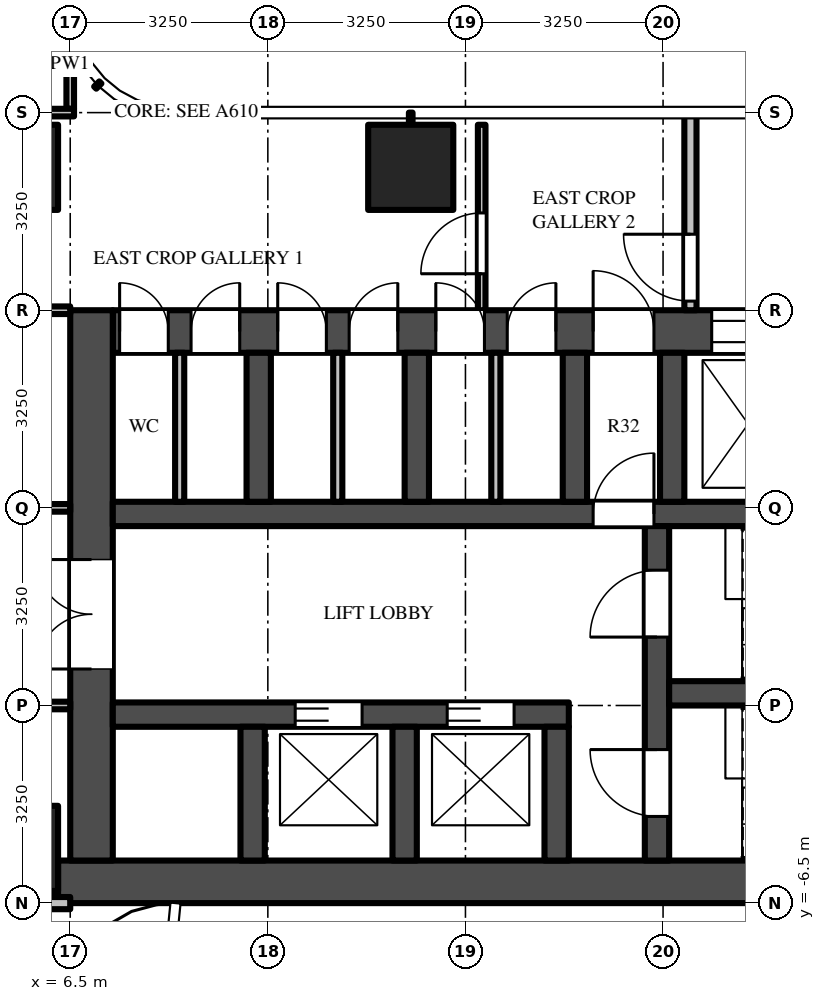
"""IFC4 building model, lengths in metres.
Left out: names, types, materials, properties, quantities, classifications, styles, units other than length and angle.
Written with IfcOpenShell. Run it as: python <this file> out.ifc"""

import sys

from ifc_helpers import new_model, si_unit, direction, frame, frame_2d, origin, origin_2d, place, context, subcontext, project, spatial, rectangle, extrude, source, transform, mapped, element, fill, save


model = new_model("IFC4")
c1 = context("Model", 3, precision=1e-05, world=origin(), true_north=direction((0.0, 1.0)))
c2 = subcontext(c1, "Body", "Model", "MODEL_VIEW")
j1 = project(units=[si_unit("LENGTHUNIT", "METRE"), si_unit("PLANEANGLEUNIT", "RADIAN")], contexts=[c1])
p1 = place(None, origin())
s1 = spatial("IfcSite", under=j1, at=p1, CompositionType="ELEMENT")
p2 = place(p1, origin())
s2 = spatial("IfcBuilding", under=s1, at=p2, CompositionType="ELEMENT")
p3 = place(p2, frame((0.0, 0.0, 74.5)))
s3 = spatial("IfcBuildingStorey", under=s2, at=p3, CompositionType="ELEMENT", Elevation=74.5)
m1 = source(origin(), c2, "Body", "SweptSolid", [
    extrude(rectangle(XDim=1.4, YDim=1.4, at=origin_2d()), origin(), (0.0, 0.0, 1.0), 4.5),
])
for number, where, z_axis, x_axis in (
    (1, (12.1, 5.6, 0.0), (0.0, 0.0, 1.0), (1.0, 0.0, 0.0)),
    (2, (5.6, 5.6, 0.0), (0.0, 0.0, 1.0), (1.0, 0.0, 0.0)),
    (3, (5.6, -5.6, 0.0), (0.0, 0.0, 1.0), (1.0, 0.0, 0.0)),
):
    element("IfcColumn", number, at=place(p3, frame(where, z_axis=z_axis, x_axis=x_axis)), inside=s3, PredefinedType="COLUMN", context=c2, shape_type="MappedRepresentation", body=[
        mapped(m1, transform((0.0, 0.0, 0.0))),
    ])
m2 = source(origin(), c2, "Body", "SweptSolid", [
    extrude(rectangle(XDim=16.45, YDim=0.7, at=frame_2d((8.225, 0.0))), origin(), (0.0, 0.0, 1.0), 4.25),
])
p4 = place(p3, frame((6.3, -6.15, 0.0), z_axis=(0.0, 0.0, 1.0), x_axis=(1.0, 0.0, 0.0)))
e4 = element("IfcWall", 4, at=p4, inside=s3, PredefinedType="SHEAR", context=c2, shape_type="MappedRepresentation", body=[
    mapped(m2, transform((0.0, 0.0, 0.0))),
])
m3 = source(origin(), c2, "Body", "SweptSolid", [
    extrude(rectangle(XDim=14.85, YDim=0.7, at=frame_2d((7.425, 0.0))), origin(), (0.0, 0.0, 1.0), 4.25),
])
p5 = place(p3, frame((7.2, 2.9, 0.0), z_axis=(0.0, 0.0, 1.0), x_axis=(1.0, 0.0, 0.0)))
e5 = element("IfcWall", 5, at=p5, inside=s3, PredefinedType="SHEAR", context=c2, shape_type="MappedRepresentation", body=[
    mapped(m3, transform((0.0, 0.0, 0.0))),
])
m4 = source(origin(), c2, "Body", "SweptSolid", [
    extrude(rectangle(XDim=1.3, YDim=2.1, at=frame_2d((0.65, 1.05))), frame((0.0, 0.36, 0.0), z_axis=(0.0, -1.0, 0.0), x_axis=(1.0, 0.0, 0.0)), (0.0, 0.0, 1.0), 0.72),
])
p6 = place(p5, frame((12.2, 0.0, 0.0)))
e6 = element("IfcOpeningElement", 6, at=p6, cuts=e5, PredefinedType="OPENING", context=c2, shape_type="MappedRepresentation", body=[
    mapped(m4, transform((0.0, 0.0, 0.0))),
])
m5 = source(origin(), c2, "Body", "SweptSolid", [
    extrude(rectangle(XDim=1.2, YDim=2.1, at=frame_2d((0.6, 1.05))), frame((0.0, 0.36, 0.0), z_axis=(0.0, -1.0, 0.0), x_axis=(1.0, 0.0, 0.0)), (0.0, 0.0, 1.0), 0.72),
])
p7 = place(p5, frame((9.85, 0.0, 0.0)))
e7 = element("IfcOpeningElement", 7, at=p7, cuts=e5, PredefinedType="OPENING", context=c2, shape_type="MappedRepresentation", body=[
    mapped(m5, transform((0.0, 0.0, 0.0))),
])
m6 = source(origin(), c2, "Body", "SweptSolid", [
    extrude(rectangle(XDim=1.0, YDim=2.1, at=frame_2d((0.5, 1.05))), frame((0.0, 0.36, 0.0), z_axis=(0.0, -1.0, 0.0), x_axis=(1.0, 0.0, 0.0)), (0.0, 0.0, 1.0), 0.72),
])
p8 = place(p5, frame((7.9, 0.0, 0.0)))
e8 = element("IfcOpeningElement", 8, at=p8, cuts=e5, PredefinedType="OPENING", context=c2, shape_type="MappedRepresentation", body=[
    mapped(m6, transform((0.0, 0.0, 0.0))),
])
m7 = source(origin(), c2, "Body", "SweptSolid", [
    extrude(rectangle(XDim=0.8, YDim=2.1, at=frame_2d((0.4, 1.05))), frame((0.0, 0.36, 0.0), z_axis=(0.0, -1.0, 0.0), x_axis=(1.0, 0.0, 0.0)), (0.0, 0.0, 1.0), 0.72),
])
p9 = place(p5, frame((0.113, 0.0, 0.0)))
e9 = element("IfcOpeningElement", 9, at=p9, cuts=e5, PredefinedType="OPENING", context=c2, shape_type="MappedRepresentation", body=[
    mapped(m7, transform((0.0, 0.0, 0.0))),
])
p10 = place(p5, frame((1.288, 0.0, 0.0)))
e10 = element("IfcOpeningElement", 10, at=p10, cuts=e5, PredefinedType="OPENING", context=c2, shape_type="MappedRepresentation", body=[
    mapped(m7, transform((0.0, 0.0, 0.0))),
])
p11 = place(p5, frame((2.712, 0.0, 0.0)))
e11 = element("IfcOpeningElement", 11, at=p11, cuts=e5, PredefinedType="OPENING", context=c2, shape_type="MappedRepresentation", body=[
    mapped(m7, transform((0.0, 0.0, 0.0))),
])
p12 = place(p5, frame((3.887, 0.0, 0.0)))
e12 = element("IfcOpeningElement", 12, at=p12, cuts=e5, PredefinedType="OPENING", context=c2, shape_type="MappedRepresentation", body=[
    mapped(m7, transform((0.0, 0.0, 0.0))),
])
p13 = place(p5, frame((5.312, 0.0, 0.0)))
e13 = element("IfcOpeningElement", 13, at=p13, cuts=e5, PredefinedType="OPENING", context=c2, shape_type="MappedRepresentation", body=[
    mapped(m7, transform((0.0, 0.0, 0.0))),
])
p14 = place(p5, frame((6.488, 0.0, 0.0)))
e14 = element("IfcOpeningElement", 14, at=p14, cuts=e5, PredefinedType="OPENING", context=c2, shape_type="MappedRepresentation", body=[
    mapped(m7, transform((0.0, 0.0, 0.0))),
])
m8 = source(origin(), c2, "Body", "SweptSolid", [
    extrude(rectangle(XDim=9.05, YDim=0.7, at=frame_2d((4.525, 0.0))), origin(), (0.0, 0.0, 1.0), 4.25),
])
p15 = place(p3, frame((6.85, -5.8, 0.0), z_axis=(0.0, 0.0, 1.0), x_axis=(0.0, 1.0, 0.0)))
e15 = element("IfcWall", 15, at=p15, inside=s3, PredefinedType="SHEAR", context=c2, shape_type="MappedRepresentation", body=[
    mapped(m8, transform((0.0, 0.0, 0.0))),
])
m9 = source(origin(), c2, "Body", "SweptSolid", [
    extrude(rectangle(XDim=1.8, YDim=2.1, at=frame_2d((0.9, 1.05))), frame((0.0, 0.36, 0.0), z_axis=(0.0, -1.0, 0.0), x_axis=(1.0, 0.0, 0.0)), (0.0, 0.0, 1.0), 0.72),
])
p16 = place(p15, frame((3.15, 0.0, 0.0)))
e16 = element("IfcOpeningElement", 16, at=p16, cuts=e15, PredefinedType="OPENING", context=c2, shape_type="MappedRepresentation", body=[
    mapped(m9, transform((0.0, 0.0, 0.0))),
])
m10 = source(origin(), c2, "Body", "SweptSolid", [
    extrude(rectangle(XDim=7.5, YDim=0.4, at=frame_2d((3.75, 0.0))), origin(), (0.0, 0.0, 1.0), 4.25),
])
p17 = place(p3, frame((7.2, -3.4, 0.0), z_axis=(0.0, 0.0, 1.0), x_axis=(1.0, 0.0, 0.0)))
e17 = element("IfcWall", 17, at=p17, inside=s3, PredefinedType="SHEAR", context=c2, shape_type="MappedRepresentation", body=[
    mapped(m10, transform((0.0, 0.0, 0.0))),
])
m11 = source(origin(), c2, "Body", "SweptSolid", [
    extrude(rectangle(XDim=1.1, YDim=2.1, at=frame_2d((0.55, 1.05))), frame((0.0, 0.21, 0.0), z_axis=(0.0, -1.0, 0.0), x_axis=(1.0, 0.0, 0.0)), (0.0, 0.0, 1.0), 0.42),
])
p18 = place(p17, frame((3.0, 0.0, 0.0)))
e18 = element("IfcOpeningElement", 18, at=p18, cuts=e17, PredefinedType="OPENING", context=c2, shape_type="MappedRepresentation", body=[
    mapped(m11, transform((0.0, 0.0, 0.0))),
])
p19 = place(p17, frame((5.5, 0.0, 0.0)))
e19 = element("IfcOpeningElement", 19, at=p19, cuts=e17, PredefinedType="OPENING", context=c2, shape_type="MappedRepresentation", body=[
    mapped(m11, transform((0.0, 0.0, 0.0))),
])
m12 = source(origin(), c2, "Body", "SweptSolid", [
    extrude(rectangle(XDim=14.85, YDim=0.4, at=frame_2d((7.425, 0.0))), origin(), (0.0, 0.0, 1.0), 4.25),
])
p20 = place(p3, frame((7.2, -0.1, 0.0), z_axis=(0.0, 0.0, 1.0), x_axis=(1.0, 0.0, 0.0)))
e20 = element("IfcWall", 20, at=p20, inside=s3, PredefinedType="SHEAR", context=c2, shape_type="MappedRepresentation", body=[
    mapped(m12, transform((0.0, 0.0, 0.0))),
])
m13 = source(origin(), c2, "Body", "SweptSolid", [
    extrude(rectangle(XDim=1.0, YDim=2.1, at=frame_2d((0.5, 1.05))), frame((0.0, 0.21, 0.0), z_axis=(0.0, -1.0, 0.0), x_axis=(1.0, 0.0, 0.0)), (0.0, 0.0, 1.0), 0.42),
])
p21 = place(p20, frame((7.9, 0.0, 0.0)))
e21 = element("IfcOpeningElement", 21, at=p21, cuts=e20, PredefinedType="OPENING", context=c2, shape_type="MappedRepresentation", body=[
    mapped(m13, transform((0.0, 0.0, 0.0))),
])
m14 = source(origin(), c2, "Body", "SweptSolid", [
    extrude(rectangle(XDim=5.5, YDim=0.4, at=frame_2d((2.75, 0.0))), origin(), (0.0, 0.0, 1.0), 4.25),
])
p22 = place(p3, frame((16.15, -5.8, 0.0), z_axis=(0.0, 0.0, 1.0), x_axis=(0.0, 1.0, 0.0)))
e22 = element("IfcWall", 22, at=p22, inside=s3, PredefinedType="SHEAR", context=c2, shape_type="MappedRepresentation", body=[
    mapped(m14, transform((0.0, 0.0, 0.0))),
])
p23 = place(p22, frame((0.725, 0.0, 0.0)))
e23 = element("IfcOpeningElement", 23, at=p23, cuts=e22, PredefinedType="OPENING", context=c2, shape_type="MappedRepresentation", body=[
    mapped(m11, transform((0.0, 0.0, 0.0))),
])
p24 = place(p22, frame((3.675, 0.0, 0.0)))
e24 = element("IfcOpeningElement", 24, at=p24, cuts=e22, PredefinedType="OPENING", context=c2, shape_type="MappedRepresentation", body=[
    mapped(m11, transform((0.0, 0.0, 0.0))),
])
m15 = source(origin(), c2, "Body", "SweptSolid", [
    extrude(rectangle(XDim=5.7, YDim=0.4, at=frame_2d((2.85, 0.0))), origin(), (0.0, 0.0, 1.0), 4.25),
])
p25 = place(p3, frame((16.35, -3.05, 0.0), z_axis=(0.0, 0.0, 1.0), x_axis=(1.0, 0.0, 0.0)))
e25 = element("IfcWall", 25, at=p25, inside=s3, PredefinedType="SHEAR", context=c2, shape_type="MappedRepresentation", body=[
    mapped(m15, transform((0.0, 0.0, 0.0))),
])
m16 = source(origin(), c2, "Body", "SweptSolid", [
    extrude(rectangle(XDim=2.2, YDim=0.4, at=frame_2d((1.1, 0.0))), origin(), (0.0, 0.0, 1.0), 4.25),
])
for number, where, z_axis, x_axis in (
    (26, (9.5, -5.8, 0.0), (0.0, 0.0, 1.0), (0.0, 1.0, 0.0)),
    (27, (12.0, -5.8, 0.0), (0.0, 0.0, 1.0), (0.0, 1.0, 0.0)),
    (28, (14.5, -5.8, 0.0), (0.0, 0.0, 1.0), (0.0, 1.0, 0.0)),
):
    element("IfcWall", number, at=place(p3, frame(where, z_axis=z_axis, x_axis=x_axis)), inside=s3, PredefinedType="SHEAR", context=c2, shape_type="MappedRepresentation", body=[
        mapped(m16, transform((0.0, 0.0, 0.0))),
    ])
m17 = source(origin(), c2, "Body", "SweptSolid", [
    extrude(rectangle(XDim=2.45, YDim=0.4, at=frame_2d((1.225, 0.0))), origin(), (0.0, 0.0, 1.0), 4.25),
])
for number, where, z_axis, x_axis in (
    (29, (9.6, 0.1, 0.0), (0.0, 0.0, 1.0), (0.0, 1.0, 0.0)),
    (30, (12.2, 0.1, 0.0), (0.0, 0.0, 1.0), (0.0, 1.0, 0.0)),
    (31, (14.8, 0.1, 0.0), (0.0, 0.0, 1.0), (0.0, 1.0, 0.0)),
    (32, (16.4, 0.1, 0.0), (0.0, 0.0, 1.0), (0.0, 1.0, 0.0)),
):
    element("IfcWall", number, at=place(p3, frame(where, z_axis=z_axis, x_axis=x_axis)), inside=s3, PredefinedType="SHEAR", context=c2, shape_type="MappedRepresentation", body=[
        mapped(m17, transform((0.0, 0.0, 0.0))),
    ])
m18 = source(origin(), c2, "Body", "SweptSolid", [
    extrude(rectangle(XDim=3.25, YDim=0.2, at=frame_2d((1.625, 0.0))), origin(), (0.0, 0.0, 1.0), 4.25),
])
p26 = place(p3, frame((16.7, 3.25, 0.0), z_axis=(0.0, 0.0, 1.0), x_axis=(0.0, 1.0, 0.0)))
e33 = element("IfcWall", 33, at=p26, inside=s3, PredefinedType="PARTITIONING", context=c2, shape_type="MappedRepresentation", body=[
    mapped(m18, transform((0.0, 0.0, 0.0))),
])
m19 = source(origin(), c2, "Body", "SweptSolid", [
    extrude(rectangle(XDim=1.1, YDim=2.1, at=frame_2d((0.55, 1.05))), frame((0.0, 0.11, 0.0), z_axis=(0.0, -1.0, 0.0), x_axis=(1.0, 0.0, 0.0)), (0.0, 0.0, 1.0), 0.22),
])
p27 = place(p26, frame((0.15, 0.0, 0.0)))
e34 = element("IfcOpeningElement", 34, at=p27, cuts=e33, PredefinedType="OPENING", context=c2, shape_type="MappedRepresentation", body=[
    mapped(m19, transform((0.0, 0.0, 0.0))),
])
m20 = source(origin(), c2, "Body", "SweptSolid", [
    extrude(rectangle(XDim=2.45, YDim=0.15, at=frame_2d((1.225, 0.0))), origin(), (0.0, 0.0, 1.0), 4.25),
])
for number, where, z_axis, x_axis in (
    (35, (8.3, 0.1, 0.0), (0.0, 0.0, 1.0), (0.0, 1.0, 0.0)),
    (36, (10.9, 0.1, 0.0), (0.0, 0.0, 1.0), (0.0, 1.0, 0.0)),
    (37, (13.5, 0.1, 0.0), (0.0, 0.0, 1.0), (0.0, 1.0, 0.0)),
):
    element("IfcWall", number, at=place(p3, frame(where, z_axis=z_axis, x_axis=x_axis)), inside=s3, PredefinedType="PARTITIONING", context=c2, shape_type="MappedRepresentation", body=[
        mapped(m20, transform((0.0, 0.0, 0.0))),
    ])
m21 = source(origin(), c2, "Body", "SweptSolid", [
    extrude(rectangle(XDim=1.469, YDim=0.125, at=frame_2d((0.734, 0.0))), origin(), (0.0, 0.0, 1.0), 4.25),
])
p28 = place(p3, frame((6.5, 6.562, 0.0), z_axis=(0.0, 0.0, 1.0), x_axis=(0.0, 1.0, 0.0)))
e38 = element("IfcWall", 38, at=p28, inside=s3, PredefinedType="PARTITIONING", context=c2, shape_type="MappedRepresentation", body=[
    mapped(m21, transform((0.0, 0.0, 0.0))),
])
m22 = source(origin(), c2, "Body", "SweptSolid", [
    extrude(rectangle(XDim=3.05, YDim=0.125, at=frame_2d((1.525, 0.0))), origin(), (0.0, 0.0, 1.0), 3.33),
])
p29 = place(p3, frame((13.267, 3.25, 0.0), z_axis=(0.0, 0.0, 1.0), x_axis=(0.0, 1.0, 0.0)))
e39 = element("IfcWall", 39, at=p29, inside=s3, PredefinedType="PARTITIONING", context=c2, shape_type="MappedRepresentation", body=[
    mapped(m22, transform((0.0, 0.0, 0.0))),
])
m23 = source(origin(), c2, "Body", "SweptSolid", [
    extrude(rectangle(XDim=1.0, YDim=2.1, at=frame_2d((0.5, 1.05))), frame((0.0, 0.073, 0.0), z_axis=(0.0, -1.0, 0.0), x_axis=(1.0, 0.0, 0.0)), (0.0, 0.0, 1.0), 0.145),
])
p30 = place(p29, frame((0.6, 0.0, 0.0)))
e40 = element("IfcOpeningElement", 40, at=p30, cuts=e39, PredefinedType="OPENING", context=c2, shape_type="MappedRepresentation", body=[
    mapped(m23, transform((0.0, 0.0, 0.0))),
])
m24 = source(origin(), c2, "Body", "SweptSolid", [
    extrude(rectangle(XDim=5.238, YDim=0.2, at=frame_2d((2.619, 0.0))), origin(), (0.0, 0.0, 1.0), 3.33),
])
p31 = place(p3, frame((1.262, -6.5, 0.0), z_axis=(0.0, 0.0, 1.0), x_axis=(1.0, 0.0, 0.0)))
e41 = element("IfcWall", 41, at=p31, inside=s3, PredefinedType="PARTITIONING", context=c2, shape_type="MappedRepresentation", body=[
    mapped(m24, transform((0.0, 0.0, 0.0))),
])
m25 = source(origin(), c2, "Body", "SweptSolid", [
    extrude(rectangle(XDim=5.363, YDim=0.125, at=frame_2d((2.681, 0.0))), origin(), (0.0, 0.0, 1.0), 3.468),
])
p32 = place(p3, frame((6.5, -3.25, 0.0), z_axis=(0.0, 0.0, 1.0), x_axis=(-1.0, 0.0, 0.0)))
e42 = element("IfcWall", 42, at=p32, inside=s3, PredefinedType="PARTITIONING", context=c2, shape_type="MappedRepresentation", body=[
    mapped(m25, transform((0.0, 0.0, 0.0))),
])
m26 = source(origin(), c2, "Body", "SweptSolid", [
    extrude(rectangle(XDim=1.1, YDim=2.1, at=frame_2d((0.55, 1.05))), frame((0.0, 0.073, 0.0), z_axis=(0.0, -1.0, 0.0), x_axis=(1.0, 0.0, 0.0)), (0.0, 0.0, 1.0), 0.145),
])
p33 = place(p32, frame((0.35, 0.0, 0.0)))
e43 = element("IfcOpeningElement", 43, at=p33, cuts=e42, PredefinedType="OPENING", context=c2, shape_type="MappedRepresentation", body=[
    mapped(m26, transform((0.0, 0.0, 0.0))),
])
p34 = place(p3, frame((6.5, 0.0, 0.0), z_axis=(0.0, 0.0, 1.0), x_axis=(-1.0, 0.0, 0.0)))
e44 = element("IfcWall", 44, at=p34, inside=s3, PredefinedType="PARTITIONING", context=c2, shape_type="MappedRepresentation", body=[
    mapped(m25, transform((0.0, 0.0, 0.0))),
])
p35 = place(p34, frame((3.95, 0.0, 0.0)))
e45 = element("IfcOpeningElement", 45, at=p35, cuts=e44, PredefinedType="OPENING", context=c2, shape_type="MappedRepresentation", body=[
    mapped(m23, transform((0.0, 0.0, 0.0))),
])
p36 = place(p3, frame((1.137, 3.25, 0.0), z_axis=(0.0, 0.0, 1.0), x_axis=(1.0, 0.0, 0.0)))
e46 = element("IfcWall", 46, at=p36, inside=s3, PredefinedType="PARTITIONING", context=c2, shape_type="MappedRepresentation", body=[
    mapped(m25, transform((0.0, 0.0, 0.0))),
])
m27 = source(origin(), c2, "Body", "SweptSolid", [
    extrude(rectangle(XDim=5.425, YDim=0.125, at=frame_2d((2.712, 0.0))), origin(), (0.0, 0.0, 1.0), 3.33),
])
p37 = place(p3, frame((1.137, 6.5, 0.0), z_axis=(0.0, 0.0, 1.0), x_axis=(1.0, 0.0, 0.0)))
e47 = element("IfcWall", 47, at=p37, inside=s3, PredefinedType="PARTITIONING", context=c2, shape_type="MappedRepresentation", body=[
    mapped(m27, transform((0.0, 0.0, 0.0))),
])
m28 = source(origin(), c2, "Body", "SweptSolid", [
    extrude(rectangle(XDim=1.1, YDim=2.1, at=frame_2d((0.55, 1.05))), frame((0.0, 0.025, 0.0), z_axis=(0.0, -1.0, 0.0), x_axis=(1.0, 0.0, 0.0)), (0.0, 0.0, 1.0), 0.05),
])
p38 = place(p18, origin())
e48 = element("IfcDoor", 48, at=p38, inside=s3, OperationType="DOUBLE_DOOR_SLIDING", PredefinedType="DOOR", context=c2, shape_type="MappedRepresentation", body=[
    mapped(m28, transform((0.0, 0.0, 0.0))),
])
fill(e18, e48)
p39 = place(p19, origin())
e49 = element("IfcDoor", 49, at=p39, inside=s3, OperationType="DOUBLE_DOOR_SLIDING", PredefinedType="DOOR", context=c2, shape_type="MappedRepresentation", body=[
    mapped(m28, transform((0.0, 0.0, 0.0))),
])
fill(e19, e49)
m29 = source(origin(), c2, "Body", "SweptSolid", [
    extrude(rectangle(XDim=1.2, YDim=2.1, at=frame_2d((0.6, 1.05))), frame((0.0, -0.275, 0.0), z_axis=(0.0, -1.0, 0.0), x_axis=(1.0, 0.0, 0.0)), (0.0, 0.0, 1.0), 0.05),
])
p40 = place(p7, origin())
e50 = element("IfcDoor", 50, at=p40, inside=s3, OperationType="DOUBLE_DOOR_SLIDING", PredefinedType="DOOR", context=c2, shape_type="MappedRepresentation", body=[
    mapped(m29, transform((0.0, 0.0, 0.0))),
])
fill(e7, e50)
m30 = source(origin(), c2, "Body", "SweptSolid", [
    extrude(rectangle(XDim=1.8, YDim=2.1, at=frame_2d((0.9, 1.05))), frame((0.0, -0.275, 0.0), z_axis=(0.0, -1.0, 0.0), x_axis=(1.0, 0.0, 0.0)), (0.0, 0.0, 1.0), 0.05),
])
p41 = place(p16, origin())
e51 = element("IfcDoor", 51, at=p41, inside=s3, OperationType="DOUBLE_DOOR_SINGLE_SWING", PredefinedType="DOOR", context=c2, shape_type="MappedRepresentation", body=[
    mapped(m30, transform((0.0, 0.0, 0.0))),
])
fill(e16, e51)
p42 = place(p23, origin())
e52 = element("IfcDoor", 52, at=p42, inside=s3, OperationType="SINGLE_SWING_RIGHT", PredefinedType="DOOR", context=c2, shape_type="MappedRepresentation", body=[
    mapped(m28, transform((0.0, 0.0, 0.0))),
])
fill(e23, e52)
p43 = place(p24, origin())
e53 = element("IfcDoor", 53, at=p43, inside=s3, OperationType="SINGLE_SWING_LEFT", PredefinedType="DOOR", context=c2, shape_type="MappedRepresentation", body=[
    mapped(m28, transform((0.0, 0.0, 0.0))),
])
fill(e24, e53)
m31 = source(origin(), c2, "Body", "SweptSolid", [
    extrude(rectangle(XDim=1.0, YDim=2.1, at=frame_2d((0.5, 1.05))), frame((0.0, 0.025, 0.0), z_axis=(0.0, -1.0, 0.0), x_axis=(1.0, 0.0, 0.0)), (0.0, 0.0, 1.0), 0.05),
])
p44 = place(p21, origin())
e54 = element("IfcDoor", 54, at=p44, inside=s3, OperationType="SINGLE_SWING_RIGHT", PredefinedType="DOOR", context=c2, shape_type="MappedRepresentation", body=[
    mapped(m31, transform((0.0, 0.0, 0.0))),
])
fill(e21, e54)
m32 = source(origin(), c2, "Body", "SweptSolid", [
    extrude(rectangle(XDim=1.0, YDim=2.1, at=frame_2d((0.5, 1.05))), frame((0.0, -0.275, 0.0), z_axis=(0.0, -1.0, 0.0), x_axis=(1.0, 0.0, 0.0)), (0.0, 0.0, 1.0), 0.05),
])
p45 = place(p8, origin())
e55 = element("IfcDoor", 55, at=p45, inside=s3, OperationType="SINGLE_SWING_LEFT", PredefinedType="DOOR", context=c2, shape_type="MappedRepresentation", body=[
    mapped(m32, transform((0.0, 0.0, 0.0))),
])
fill(e8, e55)
p46 = place(p27, origin())
e56 = element("IfcDoor", 56, at=p46, inside=s3, OperationType="SINGLE_SWING_RIGHT", PredefinedType="DOOR", context=c2, shape_type="MappedRepresentation", body=[
    mapped(m28, transform((0.0, 0.0, 0.0))),
])
fill(e34, e56)
m33 = source(origin(), c2, "Body", "SweptSolid", [
    extrude(rectangle(XDim=0.8, YDim=2.1, at=frame_2d((0.4, 1.05))), frame((0.0, -0.275, 0.0), z_axis=(0.0, -1.0, 0.0), x_axis=(1.0, 0.0, 0.0)), (0.0, 0.0, 1.0), 0.05),
])
p47 = place(p9, origin())
e57 = element("IfcDoor", 57, at=p47, inside=s3, OperationType="SINGLE_SWING_LEFT", PredefinedType="DOOR", context=c2, shape_type="MappedRepresentation", body=[
    mapped(m33, transform((0.0, 0.0, 0.0))),
])
fill(e9, e57)
p48 = place(p10, origin())
e58 = element("IfcDoor", 58, at=p48, inside=s3, OperationType="SINGLE_SWING_RIGHT", PredefinedType="DOOR", context=c2, shape_type="MappedRepresentation", body=[
    mapped(m33, transform((0.0, 0.0, 0.0))),
])
fill(e10, e58)
p49 = place(p11, origin())
e59 = element("IfcDoor", 59, at=p49, inside=s3, OperationType="SINGLE_SWING_LEFT", PredefinedType="DOOR", context=c2, shape_type="MappedRepresentation", body=[
    mapped(m33, transform((0.0, 0.0, 0.0))),
])
fill(e11, e59)
p50 = place(p12, origin())
e60 = element("IfcDoor", 60, at=p50, inside=s3, OperationType="SINGLE_SWING_RIGHT", PredefinedType="DOOR", context=c2, shape_type="MappedRepresentation", body=[
    mapped(m33, transform((0.0, 0.0, 0.0))),
])
fill(e12, e60)
p51 = place(p13, origin())
e61 = element("IfcDoor", 61, at=p51, inside=s3, OperationType="SINGLE_SWING_LEFT", PredefinedType="DOOR", context=c2, shape_type="MappedRepresentation", body=[
    mapped(m33, transform((0.0, 0.0, 0.0))),
])
fill(e13, e61)
p52 = place(p14, origin())
e62 = element("IfcDoor", 62, at=p52, inside=s3, OperationType="SINGLE_SWING_RIGHT", PredefinedType="DOOR", context=c2, shape_type="MappedRepresentation", body=[
    mapped(m33, transform((0.0, 0.0, 0.0))),
])
fill(e14, e62)
p53 = place(p30, origin())
e63 = element("IfcDoor", 63, at=p53, inside=s3, OperationType="SINGLE_SWING_LEFT", PredefinedType="DOOR", context=c2, shape_type="MappedRepresentation", body=[
    mapped(m31, transform((0.0, 0.0, 0.0))),
])
fill(e40, e63)
save(model, sys.argv[1])
